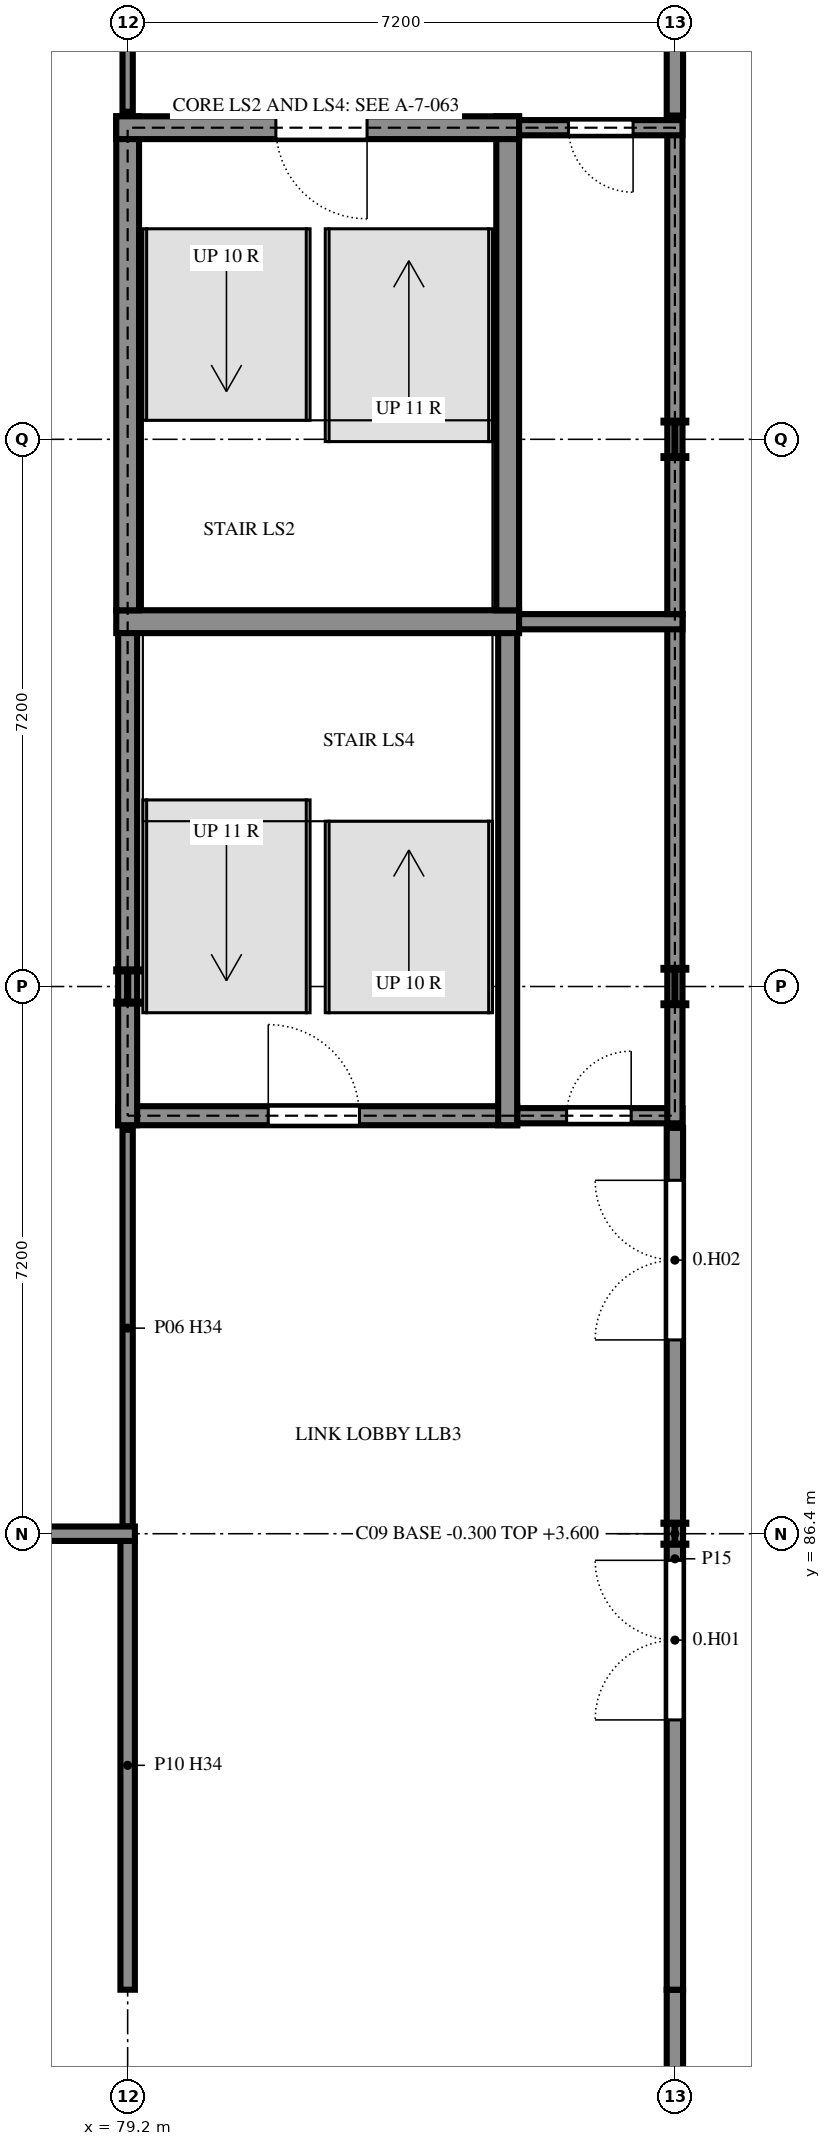
"""IFC4 building model, lengths in metres.
Left out: names, types, materials, properties, quantities, classifications, styles, units other than length and angle.
Written with IfcOpenShell. Run it as: python <this file> out.ifc"""

import sys

from ifc_helpers import new_model, si_unit, direction, frame, frame_2d, origin, origin_2d, place, context, subcontext, project, spatial, rectangle, i_section, extrude, element, fill, save


model = new_model("IFC4")
c1 = context("Model", 3, precision=1e-05, world=origin(), true_north=direction((0.0, 1.0)))
c2 = subcontext(c1, "Body", "Model", "MODEL_VIEW")
j1 = project(units=[si_unit("LENGTHUNIT", "METRE"), si_unit("PLANEANGLEUNIT", "RADIAN")], contexts=[c1])
p1 = place(None, origin())
s1 = spatial("IfcSite", under=j1, at=p1, CompositionType="ELEMENT")
p2 = place(p1, origin())
s2 = spatial("IfcBuilding", under=s1, at=p2, CompositionType="ELEMENT")
p3 = place(p2, origin())
s3 = spatial("IfcBuildingStorey", under=s2, at=p3, CompositionType="ELEMENT", Elevation=0.0)
for number, where, z_axis, x_axis in (
    (1, (79.2, 79.2, -0.3), (0.0, 0.0, 1.0), (1.0, 0.0, 0.0)),
    (2, (79.2, 93.6, -0.3), (0.0, 0.0, 1.0), (1.0, 0.0, 0.0)),
):
    element("IfcColumn", number, at=place(p3, frame(where, z_axis=z_axis, x_axis=x_axis)), inside=s3, PredefinedType="COLUMN", context=c2, shape_type="SweptSolid", body=[
        extrude(i_section(OverallWidth=0.3, OverallDepth=0.45, WebThickness=0.014, FlangeThickness=0.026, FilletRadius=0.027, at=origin_2d()), origin(), (0.0, 0.0, 1.0), 3.9),
    ])
p4 = place(p3, frame((86.4, 86.4, -0.3), z_axis=(0.0, 0.0, 1.0), x_axis=(1.0, 0.0, 0.0)))
e3 = element("IfcColumn", 3, at=p4, inside=s3, PredefinedType="COLUMN", context=c2, shape_type="SweptSolid", body=[
    extrude(i_section(OverallWidth=0.3, OverallDepth=0.29, WebThickness=0.009, FlangeThickness=0.014, FilletRadius=0.027, at=origin_2d()), origin(), (0.0, 0.0, 1.0), 3.9),
])
for number, where, z_axis, x_axis in (
    (4, (86.4, 93.6, -0.3), (0.0, 0.0, 1.0), (1.0, 0.0, 0.0)),
    (5, (86.4, 100.8, -0.3), (0.0, 0.0, 1.0), (1.0, 0.0, 0.0)),
):
    element("IfcColumn", number, at=place(p3, frame(where, z_axis=z_axis, x_axis=x_axis)), inside=s3, PredefinedType="COLUMN", context=c2, shape_type="SweptSolid", body=[
        extrude(i_section(OverallWidth=0.3, OverallDepth=0.49, WebThickness=0.012, FlangeThickness=0.023, FilletRadius=0.027, at=origin_2d()), origin(), (0.0, 0.0, 1.0), 3.9),
    ])
p5 = place(p3, frame((79.075, 91.9, 0.0), z_axis=(0.0, 0.0, 1.0), x_axis=(1.0, 0.0, 0.0)))
e6 = element("IfcWall", 6, at=p5, inside=s3, PredefinedType="SHEAR", context=c2, shape_type="SweptSolid", body=[
    extrude(rectangle(XDim=5.25, YDim=0.25, at=frame_2d((2.625, 0.0))), origin(), (0.0, 0.0, 1.0), 3.6),
])
p6 = place(p5, frame((1.975, 0.0, 0.0)))
e7 = element("IfcOpeningElement", 7, at=p6, cuts=e6, PredefinedType="OPENING", context=c2, shape_type="SweptSolid", body=[
    extrude(rectangle(XDim=1.2, YDim=2.4, at=frame_2d((0.6, 1.2))), frame((0.0, 0.135, 0.0), z_axis=(0.0, -1.0, 0.0), x_axis=(1.0, 0.0, 0.0)), (0.0, 0.0, 1.0), 0.27),
])
p7 = place(p3, frame((84.325, 91.9, 0.0), z_axis=(0.0, 0.0, 1.0), x_axis=(1.0, 0.0, 0.0)))
e8 = element("IfcWall", 8, at=p7, inside=s3, PredefinedType="SHEAR", context=c2, shape_type="SweptSolid", body=[
    extrude(rectangle(XDim=2.175, YDim=0.2, at=frame_2d((1.087, 0.0))), origin(), (0.0, 0.0, 1.0), 3.6),
])
p8 = place(p7, frame((0.65, 0.0, 0.0)))
e9 = element("IfcOpeningElement", 9, at=p8, cuts=e8, PredefinedType="OPENING", context=c2, shape_type="SweptSolid", body=[
    extrude(rectangle(XDim=0.85, YDim=2.1, at=frame_2d((0.425, 1.05))), frame((0.0, 0.11, 0.0), z_axis=(0.0, -1.0, 0.0), x_axis=(1.0, 0.0, 0.0)), (0.0, 0.0, 1.0), 0.22),
])
p9 = place(p3, frame((84.2, 91.775, 0.0), z_axis=(0.0, 0.0, 1.0), x_axis=(0.0, 1.0, 0.0)))
e10 = element("IfcWall", 10, at=p9, inside=s3, PredefinedType="SHEAR", context=c2, shape_type="SweptSolid", body=[
    extrude(rectangle(XDim=6.775, YDim=0.25, at=frame_2d((3.388, 0.0))), origin(), (0.0, 0.0, 1.0), 3.6),
])
p10 = place(p3, frame((86.4, 91.8, 0.0), z_axis=(0.0, 0.0, 1.0), x_axis=(0.0, 1.0, 0.0)))
e11 = element("IfcWall", 11, at=p10, inside=s3, PredefinedType="SHEAR", context=c2, shape_type="SweptSolid", body=[
    extrude(rectangle(XDim=6.7, YDim=0.2, at=frame_2d((3.35, 0.0))), origin(), (0.0, 0.0, 1.0), 3.6),
])
p11 = place(p3, frame((79.2, 98.55, 0.0), z_axis=(0.0, 0.0, 1.0), x_axis=(0.0, -1.0, 0.0)))
e12 = element("IfcWall", 12, at=p11, inside=s3, PredefinedType="SHEAR", context=c2, shape_type="SweptSolid", body=[
    extrude(rectangle(XDim=6.775, YDim=0.25, at=frame_2d((3.388, 0.0))), origin(), (0.0, 0.0, 1.0), 3.6),
])
p12 = place(p3, frame((84.35, 98.4, 0.0), z_axis=(0.0, 0.0, 1.0), x_axis=(-1.0, 0.0, 0.0)))
e13 = element("IfcWall", 13, at=p12, inside=s3, PredefinedType="SHEAR", context=c2, shape_type="SweptSolid", body=[
    extrude(rectangle(XDim=5.3, YDim=0.3, at=frame_2d((2.65, 0.0))), origin(), (0.0, 0.0, 1.0), 3.6),
])
p13 = place(p3, frame((84.35, 98.4, 0.0), z_axis=(0.0, 0.0, 1.0), x_axis=(1.0, 0.0, 0.0)))
e14 = element("IfcWall", 14, at=p13, inside=s3, PredefinedType="SHEAR", context=c2, shape_type="SweptSolid", body=[
    extrude(rectangle(XDim=2.15, YDim=0.2, at=frame_2d((1.075, 0.0))), origin(), (0.0, 0.0, 1.0), 3.6),
])
p14 = place(p3, frame((84.2, 98.55, 0.0), z_axis=(0.0, 0.0, 1.0), x_axis=(0.0, 1.0, 0.0)))
e15 = element("IfcWall", 15, at=p14, inside=s3, PredefinedType="SHEAR", context=c2, shape_type="SweptSolid", body=[
    extrude(rectangle(XDim=6.5, YDim=0.3, at=frame_2d((3.25, 0.0))), origin(), (0.0, 0.0, 1.0), 3.6),
])
p15 = place(p3, frame((86.4, 98.5, 0.0), z_axis=(0.0, 0.0, 1.0), x_axis=(0.0, 1.0, 0.0)))
e16 = element("IfcWall", 16, at=p15, inside=s3, PredefinedType="SHEAR", context=c2, shape_type="SweptSolid", body=[
    extrude(rectangle(XDim=6.5, YDim=0.2, at=frame_2d((3.25, 0.0))), origin(), (0.0, 0.0, 1.0), 3.6),
])
p16 = place(p3, frame((79.2, 105.05, 0.0), z_axis=(0.0, 0.0, 1.0), x_axis=(0.0, -1.0, 0.0)))
e17 = element("IfcWall", 17, at=p16, inside=s3, PredefinedType="SHEAR", context=c2, shape_type="SweptSolid", body=[
    extrude(rectangle(XDim=6.5, YDim=0.3, at=frame_2d((3.25, 0.0))), origin(), (0.0, 0.0, 1.0), 3.6),
])
p17 = place(p3, frame((84.35, 104.9, 0.0), z_axis=(0.0, 0.0, 1.0), x_axis=(-1.0, 0.0, 0.0)))
e18 = element("IfcWall", 18, at=p17, inside=s3, PredefinedType="SHEAR", context=c2, shape_type="SweptSolid", body=[
    extrude(rectangle(XDim=5.3, YDim=0.3, at=frame_2d((2.65, 0.0))), origin(), (0.0, 0.0, 1.0), 3.6),
])
p18 = place(p17, frame((2.0, 0.0, 0.0)))
e19 = element("IfcOpeningElement", 19, at=p18, cuts=e18, PredefinedType="OPENING", context=c2, shape_type="SweptSolid", body=[
    extrude(rectangle(XDim=1.2, YDim=2.4, at=frame_2d((0.6, 1.2))), frame((0.0, 0.16, 0.0), z_axis=(0.0, -1.0, 0.0), x_axis=(1.0, 0.0, 0.0)), (0.0, 0.0, 1.0), 0.32),
])
p19 = place(p3, frame((86.5, 104.9, 0.0), z_axis=(0.0, 0.0, 1.0), x_axis=(-1.0, 0.0, 0.0)))
e20 = element("IfcWall", 20, at=p19, inside=s3, PredefinedType="SHEAR", context=c2, shape_type="SweptSolid", body=[
    extrude(rectangle(XDim=2.15, YDim=0.2, at=frame_2d((1.075, 0.0))), origin(), (0.0, 0.0, 1.0), 3.6),
])
p20 = place(p19, frame((0.65, 0.0, 0.0)))
e21 = element("IfcOpeningElement", 21, at=p20, cuts=e20, PredefinedType="OPENING", context=c2, shape_type="SweptSolid", body=[
    extrude(rectangle(XDim=0.85, YDim=2.1, at=frame_2d((0.425, 1.05))), frame((0.0, 0.11, 0.0), z_axis=(0.0, -1.0, 0.0), x_axis=(1.0, 0.0, 0.0)), (0.0, 0.0, 1.0), 0.22),
])
p21 = place(p3, frame((86.4, 80.4, 0.0), z_axis=(0.0, 0.0, 1.0), x_axis=(0.0, -1.0, 0.0)))
e22 = element("IfcWall", 22, at=p21, inside=s3, PredefinedType="PARTITIONING", context=c2, shape_type="SweptSolid", body=[
    extrude(rectangle(XDim=8.24, YDim=0.215, at=frame_2d((4.12, 0.0))), origin(), (0.0, 0.0, 1.0), 3.12),
])
p22 = place(p3, frame((79.2, 86.305, 0.0), z_axis=(0.0, 0.0, 1.0), x_axis=(0.0, -1.0, 0.0)))
e23 = element("IfcWall", 23, at=p22, inside=s3, PredefinedType="PARTITIONING", context=c2, shape_type="SweptSolid", body=[
    extrude(rectangle(XDim=5.905, YDim=0.19, at=frame_2d((2.953, 0.0))), origin(), (0.0, 0.0, 1.0), 2.86),
])
p23 = place(p3, frame((79.2, 91.715, 0.0), z_axis=(0.0, 0.0, 1.0), x_axis=(0.0, -1.0, 0.0)))
e24 = element("IfcWall", 24, at=p23, inside=s3, PredefinedType="PARTITIONING", context=c2, shape_type="SweptSolid", body=[
    extrude(rectangle(XDim=5.22, YDim=0.135, at=frame_2d((2.61, 0.0))), origin(), (0.0, 0.0, 1.0), 2.86),
])
p24 = place(p3, frame((86.4, 80.4, 0.0), z_axis=(0.0, 0.0, 1.0), x_axis=(0.0, 1.0, 0.0)))
e25 = element("IfcWall", 25, at=p24, inside=s3, PredefinedType="PARTITIONING", context=c2, shape_type="SweptSolid", body=[
    extrude(rectangle(XDim=11.34, YDim=0.215, at=frame_2d((5.67, 0.0))), origin(), (0.0, 0.0, 1.0), 3.12),
])
p25 = place(p24, frame((3.55, 0.0, 0.0)))
e26 = element("IfcOpeningElement", 26, at=p25, cuts=e25, PredefinedType="OPENING", context=c2, shape_type="SweptSolid", body=[
    extrude(rectangle(XDim=2.1, YDim=2.4, at=frame_2d((1.05, 1.2))), frame((0.0, 0.117, 0.0), z_axis=(0.0, -1.0, 0.0), x_axis=(1.0, 0.0, 0.0)), (0.0, 0.0, 1.0), 0.235),
])
p26 = place(p24, frame((8.55, 0.0, 0.0)))
e27 = element("IfcOpeningElement", 27, at=p26, cuts=e25, PredefinedType="OPENING", context=c2, shape_type="SweptSolid", body=[
    extrude(rectangle(XDim=2.1, YDim=2.4, at=frame_2d((1.05, 1.2))), frame((0.0, 0.117, 0.0), z_axis=(0.0, -1.0, 0.0), x_axis=(1.0, 0.0, 0.0)), (0.0, 0.0, 1.0), 0.235),
])
p27 = place(p3, frame((79.2, 107.933, 0.0), z_axis=(0.0, 0.0, 1.0), x_axis=(0.0, -1.0, 0.0)))
e28 = element("IfcWall", 28, at=p27, inside=s3, PredefinedType="PARTITIONING", context=c2, shape_type="SweptSolid", body=[
    extrude(rectangle(XDim=2.823, YDim=0.135, at=frame_2d((1.411, 0.0))), origin(), (0.0, 0.0, 1.0), 3.21),
])
p28 = place(p3, frame((86.4, 105.06, 0.0), z_axis=(0.0, 0.0, 1.0), x_axis=(0.0, 1.0, 0.0)))
e29 = element("IfcWall", 29, at=p28, inside=s3, PredefinedType="PARTITIONING", context=c2, shape_type="SweptSolid", body=[
    extrude(rectangle(XDim=2.795, YDim=0.215, at=frame_2d((1.397, 0.0))), origin(), (0.0, 0.0, 1.0), 3.6),
])
p29 = place(p3, frame((71.305, 86.4, 0.0), z_axis=(0.0, 0.0, 1.0), x_axis=(1.0, 0.0, 0.0)))
e30 = element("IfcWall", 30, at=p29, inside=s3, PredefinedType="PARTITIONING", context=c2, shape_type="SweptSolid", body=[
    extrude(rectangle(XDim=7.99, YDim=0.19, at=frame_2d((3.995, 0.0))), origin(), (0.0, 0.0, 1.0), 2.96),
])
p30 = place(p3, frame((79.2, 78.975, 0.0), z_axis=(0.0, 0.0, 1.0), x_axis=(0.0, 1.0, 0.0)))
e31 = element("IfcWall", 31, at=p30, inside=s3, PredefinedType="PARTITIONING", context=c2, shape_type="SweptSolid", body=[
    extrude(rectangle(XDim=1.425, YDim=0.19, at=frame_2d((0.712, 0.0))), origin(), (0.0, 0.0, 1.0), 2.86),
])
p31 = place(p6, origin())
e32 = element("IfcDoor", 32, at=p31, inside=s3, OperationType="SINGLE_SWING_RIGHT", PredefinedType="DOOR", context=c2, shape_type="SweptSolid", body=[
    extrude(rectangle(XDim=1.2, YDim=2.4, at=frame_2d((0.6, 1.2))), frame((0.0, 0.025, 0.0), z_axis=(0.0, -1.0, 0.0), x_axis=(1.0, 0.0, 0.0)), (0.0, 0.0, 1.0), 0.05),
])
fill(e7, e32)
p32 = place(p18, origin())
e33 = element("IfcDoor", 33, at=p32, inside=s3, OperationType="SINGLE_SWING_RIGHT", PredefinedType="DOOR", context=c2, shape_type="SweptSolid", body=[
    extrude(rectangle(XDim=1.2, YDim=2.4, at=frame_2d((0.6, 1.2))), frame((0.0, 0.025, 0.0), z_axis=(0.0, -1.0, 0.0), x_axis=(1.0, 0.0, 0.0)), (0.0, 0.0, 1.0), 0.05),
])
fill(e19, e33)
p33 = place(p20, origin())
e34 = element("IfcDoor", 34, at=p33, inside=s3, OperationType="SINGLE_SWING_RIGHT", PredefinedType="DOOR", context=c2, shape_type="SweptSolid", body=[
    extrude(rectangle(XDim=0.85, YDim=2.1, at=frame_2d((0.425, 1.05))), frame((0.0, 0.025, 0.0), z_axis=(0.0, -1.0, 0.0), x_axis=(1.0, 0.0, 0.0)), (0.0, 0.0, 1.0), 0.05),
])
fill(e21, e34)
p34 = place(p8, origin())
e35 = element("IfcDoor", 35, at=p34, inside=s3, OperationType="SINGLE_SWING_LEFT", PredefinedType="DOOR", context=c2, shape_type="SweptSolid", body=[
    extrude(rectangle(XDim=0.85, YDim=2.1, at=frame_2d((0.425, 1.05))), frame((0.0, 0.025, 0.0), z_axis=(0.0, -1.0, 0.0), x_axis=(1.0, 0.0, 0.0)), (0.0, 0.0, 1.0), 0.05),
])
fill(e9, e35)
p35 = place(p25, origin())
e36 = element("IfcDoor", 36, at=p35, inside=s3, OperationType="DOUBLE_DOOR_SINGLE_SWING", PredefinedType="DOOR", context=c2, shape_type="SweptSolid", body=[
    extrude(rectangle(XDim=2.1, YDim=2.4, at=frame_2d((1.05, 1.2))), frame((0.0, 0.025, 0.0), z_axis=(0.0, -1.0, 0.0), x_axis=(1.0, 0.0, 0.0)), (0.0, 0.0, 1.0), 0.05),
])
fill(e26, e36)
p36 = place(p26, origin())
e37 = element("IfcDoor", 37, at=p36, inside=s3, OperationType="DOUBLE_DOOR_SINGLE_SWING", PredefinedType="DOOR", context=c2, shape_type="SweptSolid", body=[
    extrude(rectangle(XDim=2.1, YDim=2.4, at=frame_2d((1.05, 1.2))), frame((0.0, 0.025, 0.0), z_axis=(0.0, -1.0, 0.0), x_axis=(1.0, 0.0, 0.0)), (0.0, 0.0, 1.0), 0.05),
])
fill(e27, e37)
save(model, sys.argv[1])
